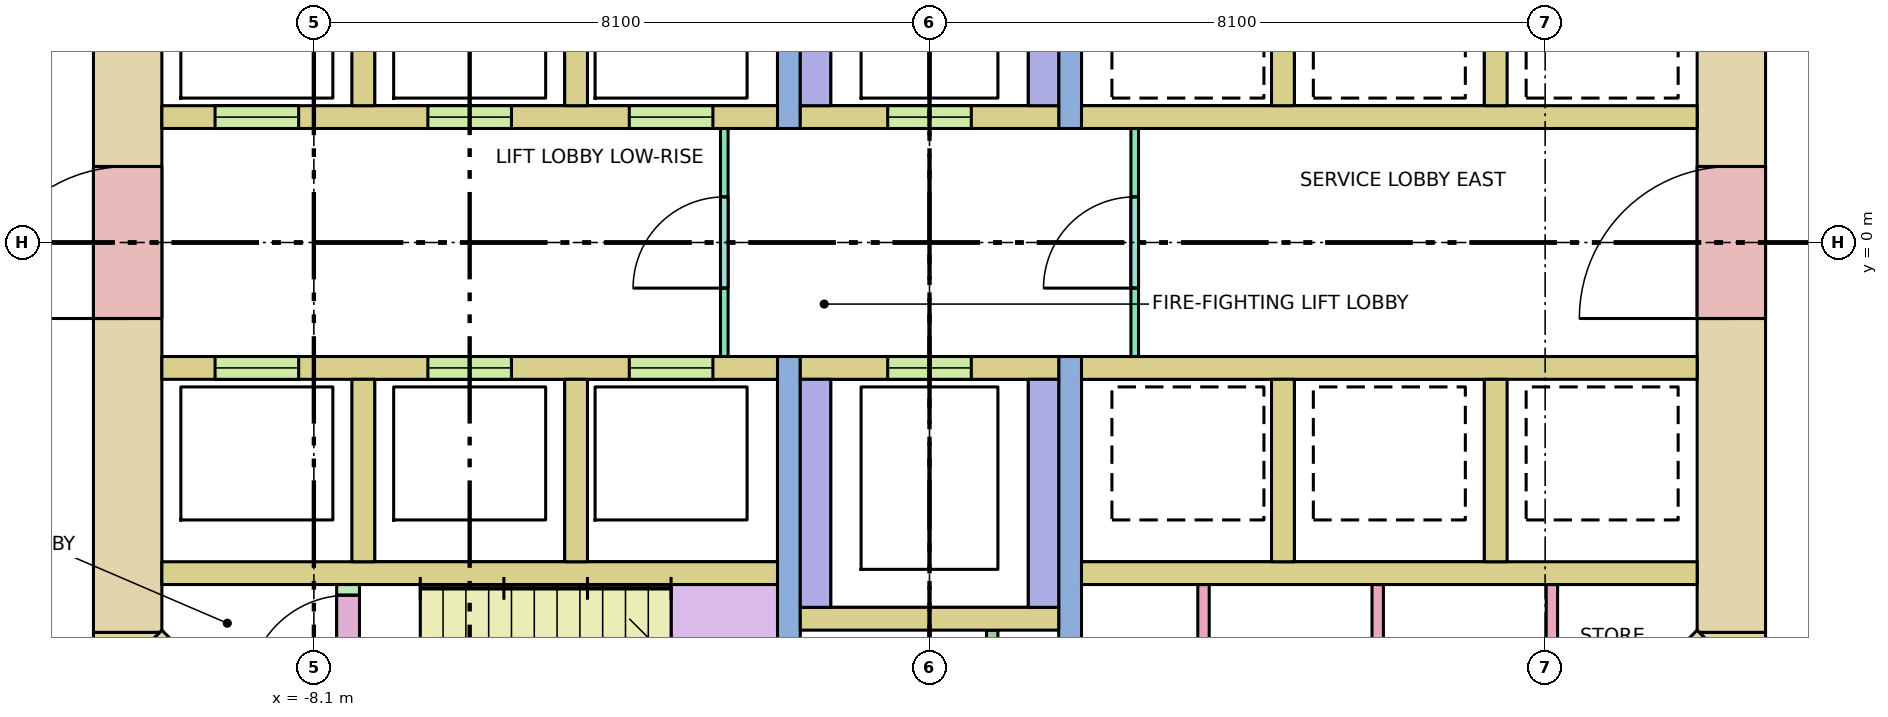
"""IFC4 building model, lengths in metres.
Left out: names, types, materials, properties, quantities, classifications, styles, units other than length and angle.
Written with IfcOpenShell. Run it as: python <this file> out.ifc"""

import sys

from ifc_helpers import new_model, si_unit, direction, frame, frame_2d, origin, place, context, subcontext, project, spatial, polyline, rectangle, outline, extrude, element, fill, save


model = new_model("IFC4")
c1 = context("Model", 3, precision=1e-05, world=origin(), true_north=direction((0.0, 1.0)))
c2 = subcontext(c1, "Body", "Model", "MODEL_VIEW")
j1 = project(units=[si_unit("LENGTHUNIT", "METRE"), si_unit("PLANEANGLEUNIT", "RADIAN")], contexts=[c1])
p1 = place(None, origin())
s1 = spatial("IfcSite", under=j1, at=p1, CompositionType="ELEMENT")
p2 = place(p1, origin())
s2 = spatial("IfcBuilding", under=s1, at=p2, CompositionType="ELEMENT")
p3 = place(p2, frame((0.0, 0.0, 59.0)))
s3 = spatial("IfcBuildingStorey", under=s2, at=p3, CompositionType="ELEMENT", Elevation=59.0)
p4 = place(p3, frame((-10.55, -5.13, -0.28), z_axis=(0.0, 0.0, 1.0), x_axis=(0.0, 1.0, 0.0)))
e1 = element("IfcWall", 1, at=p4, inside=s3, PredefinedType="SHEAR", context=c2, shape_type="SweptSolid", body=[
    extrude(rectangle(XDim=10.26, YDim=0.9, at=frame_2d((5.13, 0.0))), origin(), (0.0, 0.0, 1.0), 4.0),
])
p5 = place(p4, frame((4.13, 0.0, 0.28)))
e2 = element("IfcOpeningElement", 2, at=p5, cuts=e1, PredefinedType="OPENING", context=c2, shape_type="SweptSolid", body=[
    extrude(rectangle(XDim=2.0, YDim=2.1, at=frame_2d((1.0, 1.05))), frame((0.0, 0.46, 0.0), z_axis=(0.0, -1.0, 0.0), x_axis=(1.0, 0.0, 0.0)), (0.0, 0.0, 1.0), 0.92),
])
p6 = place(p3, frame((10.55, -5.13, -0.28), z_axis=(0.0, 0.0, 1.0), x_axis=(0.0, 1.0, 0.0)))
e3 = element("IfcWall", 3, at=p6, inside=s3, PredefinedType="SHEAR", context=c2, shape_type="SweptSolid", body=[
    extrude(rectangle(XDim=10.26, YDim=0.9, at=frame_2d((5.13, 0.0))), origin(), (0.0, 0.0, 1.0), 4.0),
])
p7 = place(p6, frame((4.13, 0.0, 0.28)))
e4 = element("IfcOpeningElement", 4, at=p7, cuts=e3, PredefinedType="OPENING", context=c2, shape_type="SweptSolid", body=[
    extrude(rectangle(XDim=2.0, YDim=2.1, at=frame_2d((1.0, 1.05))), frame((0.0, 0.46, 0.0), z_axis=(0.0, -1.0, 0.0), x_axis=(1.0, 0.0, 0.0)), (0.0, 0.0, 1.0), 0.92),
])
p8 = place(p3, frame((10.418, -5.418, -0.28), z_axis=(0.0, 0.0, 1.0), x_axis=(-0.707106781187, -0.707106781187, 0.0)))
e5 = element("IfcWall", 5, at=p8, inside=s3, PredefinedType="SHEAR", context=c2, shape_type="SweptSolid", body=[
    extrude(rectangle(XDim=4.243, YDim=0.9, at=frame_2d((2.121, 0.0))), origin(), (0.0, 0.0, 1.0), 4.0),
])
p9 = place(p8, frame((2.823, 0.0, 0.28)))
e6 = element("IfcOpeningElement", 6, at=p9, cuts=e5, PredefinedType="OPENING", context=c2, shape_type="SweptSolid", body=[
    extrude(rectangle(XDim=0.9, YDim=2.1, at=frame_2d((0.45, 1.05))), frame((0.0, 0.46, 0.0), z_axis=(0.0, -1.0, 0.0), x_axis=(1.0, 0.0, 0.0)), (0.0, 0.0, 1.0), 0.92),
])
p10 = place(p8, frame((0.52, 0.0, 0.28)))
e7 = element("IfcOpeningElement", 7, at=p10, cuts=e5, PredefinedType="OPENING", context=c2, shape_type="SweptSolid", body=[
    extrude(rectangle(XDim=0.9, YDim=2.1, at=frame_2d((0.45, 1.05))), frame((0.0, 0.46, 0.0), z_axis=(0.0, -1.0, 0.0), x_axis=(1.0, 0.0, 0.0)), (0.0, 0.0, 1.0), 0.92),
])
p11 = place(p3, frame((-7.418, -8.418, -0.28), z_axis=(0.0, 0.0, 1.0), x_axis=(-0.707106781187, 0.707106781187, 0.0)))
e8 = element("IfcWall", 8, at=p11, inside=s3, PredefinedType="SHEAR", context=c2, shape_type="SweptSolid", body=[
    extrude(rectangle(XDim=4.243, YDim=0.9, at=frame_2d((2.121, 0.0))), origin(), (0.0, 0.0, 1.0), 4.0),
])
p12 = place(p11, frame((2.393, 0.0, 0.28)))
e9 = element("IfcOpeningElement", 9, at=p12, cuts=e8, PredefinedType="OPENING", context=c2, shape_type="SweptSolid", body=[
    extrude(rectangle(XDim=1.2, YDim=2.1, at=frame_2d((0.6, 1.05))), frame((0.0, 0.46, 0.0), z_axis=(0.0, -1.0, 0.0), x_axis=(1.0, 0.0, 0.0)), (0.0, 0.0, 1.0), 0.92),
])
p13 = place(p3, frame((0.0, 0.0, -0.28)))
e10 = element("IfcWall", 10, at=p13, inside=s3, PredefinedType="SHEAR", context=c2, shape_type="SweptSolid", body=[
    extrude(outline(polyline([(-11.0, -5.473), (-11.0, -5.13), (-10.13, -5.13), (-10.736, -5.736), (-11.0, -5.473)])), origin(), (0.0, 0.0, 1.0), 4.0),
])
p14 = place(p3, frame((0.0, 0.0, -0.28)))
e11 = element("IfcWall", 11, at=p14, inside=s3, PredefinedType="SHEAR", context=c2, shape_type="SweptSolid", body=[
    extrude(outline(polyline([(11.0, -5.473), (10.736, -5.736), (10.13, -5.13), (11.0, -5.13), (11.0, -5.473)])), origin(), (0.0, 0.0, 1.0), 4.0),
])
for number, where, z_axis, x_axis in (
    (12, (-10.1, -4.35, 0.0), (0.0, 0.0, 1.0), (1.0, 0.0, 0.0)),
    (13, (2.0, -4.35, 0.0), (0.0, 0.0, 1.0), (1.0, 0.0, 0.0)),
):
    element("IfcWall", number, at=place(p3, frame(where, z_axis=z_axis, x_axis=x_axis)), inside=s3, PredefinedType="SOLIDWALL", context=c2, shape_type="SweptSolid", body=[
        extrude(rectangle(XDim=8.1, YDim=0.3, at=frame_2d((4.05, 0.0))), origin(), (0.0, 0.0, 1.0), 3.72),
    ])
p15 = place(p3, frame((-10.1, 1.65, 0.0), z_axis=(0.0, 0.0, 1.0), x_axis=(1.0, 0.0, 0.0)))
e14 = element("IfcWall", 14, at=p15, inside=s3, PredefinedType="SOLIDWALL", context=c2, shape_type="SweptSolid", body=[
    extrude(rectangle(XDim=8.1, YDim=0.3, at=frame_2d((4.05, 0.0))), origin(), (0.0, 0.0, 1.0), 3.72),
])
p16 = place(p15, frame((0.7, 0.0, 0.0)))
e15 = element("IfcOpeningElement", 15, at=p16, cuts=e14, PredefinedType="OPENING", context=c2, shape_type="SweptSolid", body=[
    extrude(rectangle(XDim=1.1, YDim=2.1, at=frame_2d((0.55, 1.05))), frame((0.0, 0.16, 0.0), z_axis=(0.0, -1.0, 0.0), x_axis=(1.0, 0.0, 0.0)), (0.0, 0.0, 1.0), 0.32),
])
p17 = place(p15, frame((3.5, 0.0, 0.0)))
e16 = element("IfcOpeningElement", 16, at=p17, cuts=e14, PredefinedType="OPENING", context=c2, shape_type="SweptSolid", body=[
    extrude(rectangle(XDim=1.1, YDim=2.1, at=frame_2d((0.55, 1.05))), frame((0.0, 0.16, 0.0), z_axis=(0.0, -1.0, 0.0), x_axis=(1.0, 0.0, 0.0)), (0.0, 0.0, 1.0), 0.32),
])
p18 = place(p15, frame((6.15, 0.0, 0.0)))
e17 = element("IfcOpeningElement", 17, at=p18, cuts=e14, PredefinedType="OPENING", context=c2, shape_type="SweptSolid", body=[
    extrude(rectangle(XDim=1.1, YDim=2.1, at=frame_2d((0.55, 1.05))), frame((0.0, 0.16, 0.0), z_axis=(0.0, -1.0, 0.0), x_axis=(1.0, 0.0, 0.0)), (0.0, 0.0, 1.0), 0.32),
])
p19 = place(p3, frame((-10.1, -1.65, 0.0), z_axis=(0.0, 0.0, 1.0), x_axis=(1.0, 0.0, 0.0)))
e18 = element("IfcWall", 18, at=p19, inside=s3, PredefinedType="SOLIDWALL", context=c2, shape_type="SweptSolid", body=[
    extrude(rectangle(XDim=8.1, YDim=0.3, at=frame_2d((4.05, 0.0))), origin(), (0.0, 0.0, 1.0), 3.72),
])
p20 = place(p19, frame((0.7, 0.0, 0.0)))
e19 = element("IfcOpeningElement", 19, at=p20, cuts=e18, PredefinedType="OPENING", context=c2, shape_type="SweptSolid", body=[
    extrude(rectangle(XDim=1.1, YDim=2.1, at=frame_2d((0.55, 1.05))), frame((0.0, 0.16, 0.0), z_axis=(0.0, -1.0, 0.0), x_axis=(1.0, 0.0, 0.0)), (0.0, 0.0, 1.0), 0.32),
])
p21 = place(p19, frame((3.5, 0.0, 0.0)))
e20 = element("IfcOpeningElement", 20, at=p21, cuts=e18, PredefinedType="OPENING", context=c2, shape_type="SweptSolid", body=[
    extrude(rectangle(XDim=1.1, YDim=2.1, at=frame_2d((0.55, 1.05))), frame((0.0, 0.16, 0.0), z_axis=(0.0, -1.0, 0.0), x_axis=(1.0, 0.0, 0.0)), (0.0, 0.0, 1.0), 0.32),
])
p22 = place(p19, frame((6.15, 0.0, 0.0)))
e21 = element("IfcOpeningElement", 21, at=p22, cuts=e18, PredefinedType="OPENING", context=c2, shape_type="SweptSolid", body=[
    extrude(rectangle(XDim=1.1, YDim=2.1, at=frame_2d((0.55, 1.05))), frame((0.0, 0.16, 0.0), z_axis=(0.0, -1.0, 0.0), x_axis=(1.0, 0.0, 0.0)), (0.0, 0.0, 1.0), 0.32),
])
for number, where, z_axis, x_axis in (
    (22, (2.0, 1.65, 0.0), (0.0, 0.0, 1.0), (1.0, 0.0, 0.0)),
    (23, (2.0, -1.65, 0.0), (0.0, 0.0, 1.0), (1.0, 0.0, 0.0)),
):
    element("IfcWall", number, at=place(p3, frame(where, z_axis=z_axis, x_axis=x_axis)), inside=s3, PredefinedType="SOLIDWALL", context=c2, shape_type="SweptSolid", body=[
        extrude(rectangle(XDim=8.1, YDim=0.3, at=frame_2d((4.05, 0.0))), origin(), (0.0, 0.0, 1.0), 3.72),
    ])
for number, where, z_axis, x_axis in (
    (24, (-7.45, 1.8, 0.0), (0.0, 0.0, 1.0), (0.0, 1.0, 0.0)),
    (25, (-7.45, -4.2, 0.0), (0.0, 0.0, 1.0), (0.0, 1.0, 0.0)),
    (26, (-4.65, 1.8, 0.0), (0.0, 0.0, 1.0), (0.0, 1.0, 0.0)),
    (27, (-4.65, -4.2, 0.0), (0.0, 0.0, 1.0), (0.0, 1.0, 0.0)),
    (28, (4.65, 1.8, 0.0), (0.0, 0.0, 1.0), (0.0, 1.0, 0.0)),
    (29, (4.65, -4.2, 0.0), (0.0, 0.0, 1.0), (0.0, 1.0, 0.0)),
    (30, (7.45, 1.8, 0.0), (0.0, 0.0, 1.0), (0.0, 1.0, 0.0)),
    (31, (7.45, -4.2, 0.0), (0.0, 0.0, 1.0), (0.0, 1.0, 0.0)),
):
    element("IfcWall", number, at=place(p3, frame(where, z_axis=z_axis, x_axis=x_axis)), inside=s3, PredefinedType="SOLIDWALL", context=c2, shape_type="SweptSolid", body=[
        extrude(rectangle(XDim=2.4, YDim=0.3, at=frame_2d((1.2, 0.0))), origin(), (0.0, 0.0, 1.0), 3.72),
    ])
for number, where, z_axis, x_axis in (
    (32, (-1.85, 1.5, 0.0), (0.0, 0.0, 1.0), (0.0, 1.0, 0.0)),
    (33, (-1.85, -8.1, 0.0), (0.0, 0.0, 1.0), (0.0, 1.0, 0.0)),
    (34, (1.85, 1.5, 0.0), (0.0, 0.0, 1.0), (0.0, 1.0, 0.0)),
    (35, (1.85, -8.1, 0.0), (0.0, 0.0, 1.0), (0.0, 1.0, 0.0)),
):
    element("IfcWall", number, at=place(p3, frame(where, z_axis=z_axis, x_axis=x_axis)), inside=s3, PredefinedType="SHEAR", context=c2, shape_type="SweptSolid", body=[
        extrude(rectangle(XDim=6.6, YDim=0.3, at=frame_2d((3.3, 0.0))), origin(), (0.0, 0.0, 1.0), 3.72),
    ])
p23 = place(p3, frame((-1.7, 1.65, 0.0), z_axis=(0.0, 0.0, 1.0), x_axis=(1.0, 0.0, 0.0)))
e36 = element("IfcWall", 36, at=p23, inside=s3, PredefinedType="SOLIDWALL", context=c2, shape_type="SweptSolid", body=[
    extrude(rectangle(XDim=3.4, YDim=0.3, at=frame_2d((1.7, 0.0))), origin(), (0.0, 0.0, 1.0), 3.72),
])
p24 = place(p23, frame((1.15, 0.0, 0.0)))
e37 = element("IfcOpeningElement", 37, at=p24, cuts=e36, PredefinedType="OPENING", context=c2, shape_type="SweptSolid", body=[
    extrude(rectangle(XDim=1.1, YDim=2.1, at=frame_2d((0.55, 1.05))), frame((0.0, 0.16, 0.0), z_axis=(0.0, -1.0, 0.0), x_axis=(1.0, 0.0, 0.0)), (0.0, 0.0, 1.0), 0.32),
])
p25 = place(p3, frame((-1.7, -1.65, 0.0), z_axis=(0.0, 0.0, 1.0), x_axis=(1.0, 0.0, 0.0)))
e38 = element("IfcWall", 38, at=p25, inside=s3, PredefinedType="SOLIDWALL", context=c2, shape_type="SweptSolid", body=[
    extrude(rectangle(XDim=3.4, YDim=0.3, at=frame_2d((1.7, 0.0))), origin(), (0.0, 0.0, 1.0), 3.72),
])
p26 = place(p25, frame((1.15, 0.0, 0.0)))
e39 = element("IfcOpeningElement", 39, at=p26, cuts=e38, PredefinedType="OPENING", context=c2, shape_type="SweptSolid", body=[
    extrude(rectangle(XDim=1.1, YDim=2.1, at=frame_2d((0.55, 1.05))), frame((0.0, 0.16, 0.0), z_axis=(0.0, -1.0, 0.0), x_axis=(1.0, 0.0, 0.0)), (0.0, 0.0, 1.0), 0.32),
])
for number, where, z_axis, x_axis in (
    (40, (-1.5, 1.8, 0.0), (0.0, 0.0, 1.0), (0.0, 1.0, 0.0)),
    (41, (-1.5, -4.8, 0.0), (0.0, 0.0, 1.0), (0.0, 1.0, 0.0)),
    (42, (1.5, 1.8, 0.0), (0.0, 0.0, 1.0), (0.0, 1.0, 0.0)),
    (43, (1.5, -4.8, 0.0), (0.0, 0.0, 1.0), (0.0, 1.0, 0.0)),
):
    element("IfcWall", number, at=place(p3, frame(where, z_axis=z_axis, x_axis=x_axis)), inside=s3, PredefinedType="SOLIDWALL", context=c2, shape_type="SweptSolid", body=[
        extrude(rectangle(XDim=3.0, YDim=0.4, at=frame_2d((1.5, 0.0))), origin(), (0.0, 0.0, 1.0), 3.72),
    ])
p27 = place(p3, frame((-1.7, -4.95, 0.0), z_axis=(0.0, 0.0, 1.0), x_axis=(1.0, 0.0, 0.0)))
e44 = element("IfcWall", 44, at=p27, inside=s3, PredefinedType="SOLIDWALL", context=c2, shape_type="SweptSolid", body=[
    extrude(rectangle(XDim=3.4, YDim=0.3, at=frame_2d((1.7, 0.0))), origin(), (0.0, 0.0, 1.0), 3.72),
])
p28 = place(p3, frame((-7.65, -7.64, 0.0), z_axis=(0.0, 0.0, 1.0), x_axis=(0.0, 1.0, 0.0)))
e45 = element("IfcWall", 45, at=p28, inside=s3, PredefinedType="SHEAR", context=c2, shape_type="SweptSolid", body=[
    extrude(rectangle(XDim=3.14, YDim=0.3, at=frame_2d((1.57, 0.0))), origin(), (0.0, 0.0, 1.0), 3.72),
])
p29 = place(p28, frame((1.68, 0.0, 0.0)))
e46 = element("IfcOpeningElement", 46, at=p29, cuts=e45, PredefinedType="OPENING", context=c2, shape_type="SweptSolid", body=[
    extrude(rectangle(XDim=1.32, YDim=2.1, at=frame_2d((0.66, 1.05))), frame((0.0, 0.16, 0.0), z_axis=(0.0, -1.0, 0.0), x_axis=(1.0, 0.0, 0.0)), (0.0, 0.0, 1.0), 0.32),
])
p30 = place(p3, frame((-2.7, -1.5, 0.0), z_axis=(0.0, 0.0, 1.0), x_axis=(0.0, 1.0, 0.0)))
e47 = element("IfcWall", 47, at=p30, inside=s3, PredefinedType="PARTITIONING", context=c2, shape_type="SweptSolid", body=[
    extrude(rectangle(XDim=3.0, YDim=0.1, at=frame_2d((1.5, 0.0))), origin(), (0.0, 0.0, 1.0), 3.72),
])
p31 = place(p30, frame((0.9, 0.0, 0.0)))
e48 = element("IfcOpeningElement", 48, at=p31, cuts=e47, PredefinedType="OPENING", context=c2, shape_type="SweptSolid", body=[
    extrude(rectangle(XDim=1.2, YDim=2.1, at=frame_2d((0.6, 1.05))), frame((0.0, 0.06, 0.0), z_axis=(0.0, -1.0, 0.0), x_axis=(1.0, 0.0, 0.0)), (0.0, 0.0, 1.0), 0.12),
])
p32 = place(p3, frame((2.7, -1.5, 0.0), z_axis=(0.0, 0.0, 1.0), x_axis=(0.0, 1.0, 0.0)))
e49 = element("IfcWall", 49, at=p32, inside=s3, PredefinedType="PARTITIONING", context=c2, shape_type="SweptSolid", body=[
    extrude(rectangle(XDim=3.0, YDim=0.1, at=frame_2d((1.5, 0.0))), origin(), (0.0, 0.0, 1.0), 3.72),
])
p33 = place(p32, frame((0.9, 0.0, 0.0)))
e50 = element("IfcOpeningElement", 50, at=p33, cuts=e49, PredefinedType="OPENING", context=c2, shape_type="SweptSolid", body=[
    extrude(rectangle(XDim=1.2, YDim=2.1, at=frame_2d((0.6, 1.05))), frame((0.0, 0.06, 0.0), z_axis=(0.0, -1.0, 0.0), x_axis=(1.0, 0.0, 0.0)), (0.0, 0.0, 1.0), 0.12),
])
p34 = place(p3, frame((0.825, -8.1, 0.0), z_axis=(0.0, 0.0, 1.0), x_axis=(0.0, 1.0, 0.0)))
e51 = element("IfcWall", 51, at=p34, inside=s3, PredefinedType="PARTITIONING", context=c2, shape_type="SweptSolid", body=[
    extrude(rectangle(XDim=3.0, YDim=0.15, at=frame_2d((1.5, 0.0))), origin(), (0.0, 0.0, 1.0), 3.72),
])
for number, where, z_axis, x_axis in (
    (52, (3.605, -8.1, 0.0), (0.0, 0.0, 1.0), (0.0, 1.0, 0.0)),
    (53, (5.897, -8.1, 0.0), (0.0, 0.0, 1.0), (0.0, 1.0, 0.0)),
):
    element("IfcWall", number, at=place(p3, frame(where, z_axis=z_axis, x_axis=x_axis)), inside=s3, PredefinedType="PARTITIONING", context=c2, shape_type="SweptSolid", body=[
        extrude(rectangle(XDim=3.6, YDim=0.15, at=frame_2d((1.8, 0.0))), origin(), (0.0, 0.0, 1.0), 3.72),
    ])
p35 = place(p3, frame((8.189, -6.936, 0.0), z_axis=(0.0, 0.0, 1.0), x_axis=(0.0, 1.0, 0.0)))
e54 = element("IfcWall", 54, at=p35, inside=s3, PredefinedType="PARTITIONING", context=c2, shape_type="SweptSolid", body=[
    extrude(rectangle(XDim=2.436, YDim=0.15, at=frame_2d((1.218, 0.0))), origin(), (0.0, 0.0, 1.0), 3.72),
])
p36 = place(p16, origin())
e55 = element("IfcDoor", 55, at=p36, inside=s3, OperationType="DOUBLE_DOOR_SLIDING", PredefinedType="DOOR", context=c2, shape_type="SweptSolid", body=[
    extrude(rectangle(XDim=1.1, YDim=2.1, at=frame_2d((0.55, 1.05))), frame((0.0, 0.025, 0.0), z_axis=(0.0, -1.0, 0.0), x_axis=(1.0, 0.0, 0.0)), (0.0, 0.0, 1.0), 0.05),
])
fill(e15, e55)
p37 = place(p17, origin())
e56 = element("IfcDoor", 56, at=p37, inside=s3, OperationType="DOUBLE_DOOR_SLIDING", PredefinedType="DOOR", context=c2, shape_type="SweptSolid", body=[
    extrude(rectangle(XDim=1.1, YDim=2.1, at=frame_2d((0.55, 1.05))), frame((0.0, 0.025, 0.0), z_axis=(0.0, -1.0, 0.0), x_axis=(1.0, 0.0, 0.0)), (0.0, 0.0, 1.0), 0.05),
])
fill(e16, e56)
p38 = place(p18, origin())
e57 = element("IfcDoor", 57, at=p38, inside=s3, OperationType="DOUBLE_DOOR_SLIDING", PredefinedType="DOOR", context=c2, shape_type="SweptSolid", body=[
    extrude(rectangle(XDim=1.1, YDim=2.1, at=frame_2d((0.55, 1.05))), frame((0.0, 0.025, 0.0), z_axis=(0.0, -1.0, 0.0), x_axis=(1.0, 0.0, 0.0)), (0.0, 0.0, 1.0), 0.05),
])
fill(e17, e57)
p39 = place(p20, origin())
e58 = element("IfcDoor", 58, at=p39, inside=s3, OperationType="DOUBLE_DOOR_SLIDING", PredefinedType="DOOR", context=c2, shape_type="SweptSolid", body=[
    extrude(rectangle(XDim=1.1, YDim=2.1, at=frame_2d((0.55, 1.05))), frame((0.0, 0.025, 0.0), z_axis=(0.0, -1.0, 0.0), x_axis=(1.0, 0.0, 0.0)), (0.0, 0.0, 1.0), 0.05),
])
fill(e19, e58)
p40 = place(p21, origin())
e59 = element("IfcDoor", 59, at=p40, inside=s3, OperationType="DOUBLE_DOOR_SLIDING", PredefinedType="DOOR", context=c2, shape_type="SweptSolid", body=[
    extrude(rectangle(XDim=1.1, YDim=2.1, at=frame_2d((0.55, 1.05))), frame((0.0, 0.025, 0.0), z_axis=(0.0, -1.0, 0.0), x_axis=(1.0, 0.0, 0.0)), (0.0, 0.0, 1.0), 0.05),
])
fill(e20, e59)
p41 = place(p22, origin())
e60 = element("IfcDoor", 60, at=p41, inside=s3, OperationType="DOUBLE_DOOR_SLIDING", PredefinedType="DOOR", context=c2, shape_type="SweptSolid", body=[
    extrude(rectangle(XDim=1.1, YDim=2.1, at=frame_2d((0.55, 1.05))), frame((0.0, 0.025, 0.0), z_axis=(0.0, -1.0, 0.0), x_axis=(1.0, 0.0, 0.0)), (0.0, 0.0, 1.0), 0.05),
])
fill(e21, e60)
p42 = place(p24, origin())
e61 = element("IfcDoor", 61, at=p42, inside=s3, OperationType="DOUBLE_DOOR_SLIDING", PredefinedType="DOOR", context=c2, shape_type="SweptSolid", body=[
    extrude(rectangle(XDim=1.1, YDim=2.1, at=frame_2d((0.55, 1.05))), frame((0.0, 0.025, 0.0), z_axis=(0.0, -1.0, 0.0), x_axis=(1.0, 0.0, 0.0)), (0.0, 0.0, 1.0), 0.05),
])
fill(e37, e61)
p43 = place(p26, origin())
e62 = element("IfcDoor", 62, at=p43, inside=s3, OperationType="DOUBLE_DOOR_SLIDING", PredefinedType="DOOR", context=c2, shape_type="SweptSolid", body=[
    extrude(rectangle(XDim=1.1, YDim=2.1, at=frame_2d((0.55, 1.05))), frame((0.0, 0.025, 0.0), z_axis=(0.0, -1.0, 0.0), x_axis=(1.0, 0.0, 0.0)), (0.0, 0.0, 1.0), 0.05),
])
fill(e39, e62)
p44 = place(p29, origin())
e63 = element("IfcDoor", 63, at=p44, inside=s3, OperationType="DOUBLE_DOOR_SINGLE_SWING", PredefinedType="DOOR", context=c2, shape_type="SweptSolid", body=[
    extrude(rectangle(XDim=1.32, YDim=2.1, at=frame_2d((0.66, 1.05))), frame((0.0, 0.025, 0.0), z_axis=(0.0, -1.0, 0.0), x_axis=(1.0, 0.0, 0.0)), (0.0, 0.0, 1.0), 0.05),
])
fill(e46, e63)
p45 = place(p5, origin())
e64 = element("IfcDoor", 64, at=p45, inside=s3, OperationType="DOUBLE_DOOR_SINGLE_SWING", PredefinedType="DOOR", context=c2, shape_type="SweptSolid", body=[
    extrude(rectangle(XDim=2.0, YDim=2.1, at=frame_2d((1.0, 1.05))), frame((0.0, 0.025, 0.0), z_axis=(0.0, -1.0, 0.0), x_axis=(1.0, 0.0, 0.0)), (0.0, 0.0, 1.0), 0.05),
])
fill(e2, e64)
p46 = place(p7, origin())
e65 = element("IfcDoor", 65, at=p46, inside=s3, OperationType="DOUBLE_DOOR_SINGLE_SWING", PredefinedType="DOOR", context=c2, shape_type="SweptSolid", body=[
    extrude(rectangle(XDim=2.0, YDim=2.1, at=frame_2d((1.0, 1.05))), frame((0.0, 0.025, 0.0), z_axis=(0.0, -1.0, 0.0), x_axis=(1.0, 0.0, 0.0)), (0.0, 0.0, 1.0), 0.05),
])
fill(e4, e65)
p47 = place(p31, origin())
e66 = element("IfcDoor", 66, at=p47, inside=s3, OperationType="SINGLE_SWING_LEFT", PredefinedType="DOOR", context=c2, shape_type="SweptSolid", body=[
    extrude(rectangle(XDim=1.2, YDim=2.1, at=frame_2d((0.6, 1.05))), frame((0.0, 0.025, 0.0), z_axis=(0.0, -1.0, 0.0), x_axis=(1.0, 0.0, 0.0)), (0.0, 0.0, 1.0), 0.05),
])
fill(e48, e66)
p48 = place(p33, origin())
e67 = element("IfcDoor", 67, at=p48, inside=s3, OperationType="SINGLE_SWING_LEFT", PredefinedType="DOOR", context=c2, shape_type="SweptSolid", body=[
    extrude(rectangle(XDim=1.2, YDim=2.1, at=frame_2d((0.6, 1.05))), frame((0.0, 0.025, 0.0), z_axis=(0.0, -1.0, 0.0), x_axis=(1.0, 0.0, 0.0)), (0.0, 0.0, 1.0), 0.05),
])
fill(e50, e67)
save(model, sys.argv[1])
